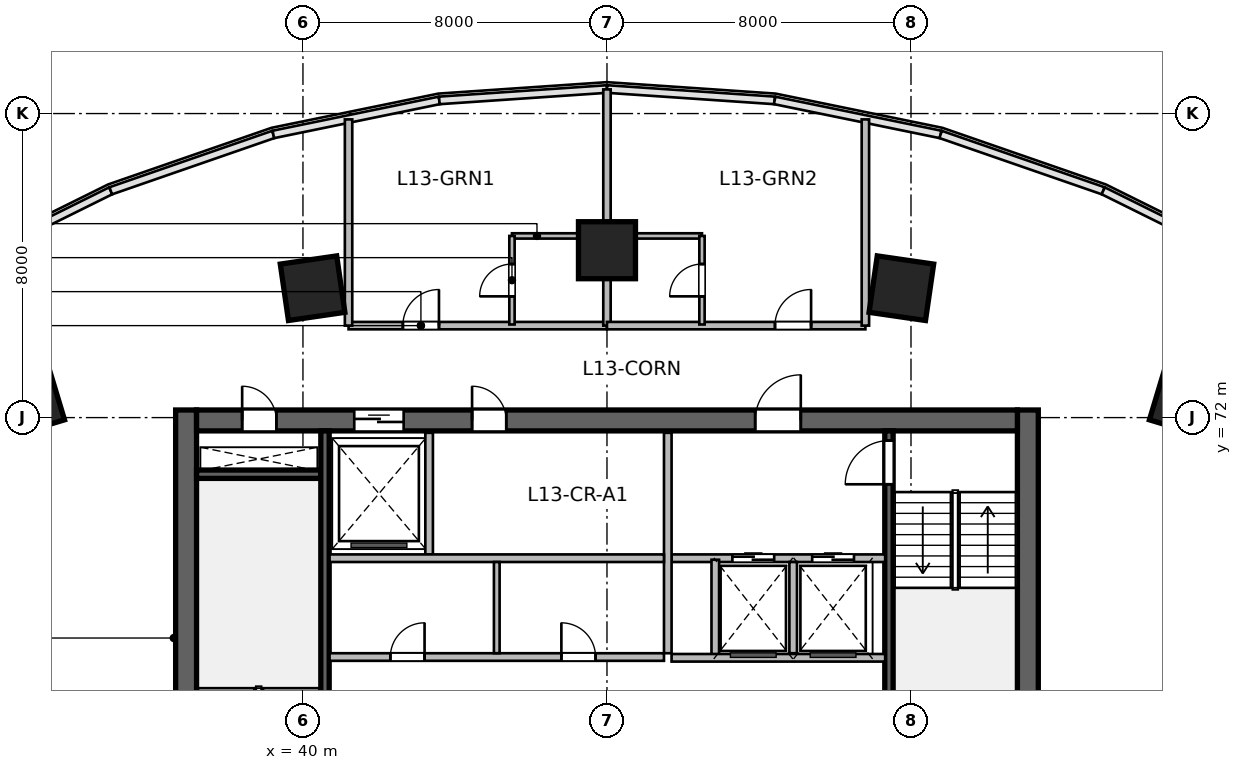
"""IFC4 building model, lengths in metres.
Left out: names, types, materials, properties, quantities, classifications, styles, units other than length and angle.
Written with IfcOpenShell. Run it as: python <this file> out.ifc"""

import sys

from ifc_helpers import new_model, si_unit, direction, frame, frame_2d, origin, origin_2d, place, context, subcontext, project, spatial, rectangle, extrude, source, transform, mapped, element, fill, save


model = new_model("IFC4")
c1 = context("Model", 3, precision=1e-05, world=origin(), true_north=direction((0.0, 1.0)))
c2 = subcontext(c1, "Body", "Model", "MODEL_VIEW")
j1 = project(units=[si_unit("LENGTHUNIT", "METRE"), si_unit("PLANEANGLEUNIT", "RADIAN")], contexts=[c1])
p1 = place(None, origin())
s1 = spatial("IfcSite", under=j1, at=p1, CompositionType="ELEMENT")
p2 = place(p1, origin())
s2 = spatial("IfcBuilding", under=s1, at=p2, CompositionType="ELEMENT")
p3 = place(p2, frame((0.0, 0.0, 60.6)))
s3 = spatial("IfcBuildingStorey", under=s2, at=p3, CompositionType="ELEMENT", Elevation=60.6)
m1 = source(origin(), c2, "Body", "SweptSolid", [
    extrude(rectangle(XDim=12.0, YDim=0.55, at=frame_2d((6.0, 0.0))), origin(), (0.0, 0.0, 1.0), 3.6),
])
for number, where, z_axis, x_axis in (
    (1, (36.925, 60.2, 0.0), (0.0, 0.0, 1.0), (0.0, 1.0, 0.0)),
    (2, (59.075, 60.2, 0.0), (0.0, 0.0, 1.0), (0.0, 1.0, 0.0)),
):
    element("IfcWall", number, at=place(p3, frame(where, z_axis=z_axis, x_axis=x_axis)), inside=s3, PredefinedType="SHEAR", context=c2, shape_type="MappedRepresentation", body=[
        mapped(m1, transform((0.0, 0.0, 0.0), scale=1.0)),
    ])
m2 = source(origin(), c2, "Body", "SweptSolid", [
    extrude(rectangle(XDim=21.6, YDim=0.55, at=frame_2d((10.8, 0.0))), origin(), (0.0, 0.0, 1.0), 3.6),
])
p4 = place(p3, frame((37.2, 71.925, 0.0), z_axis=(0.0, 0.0, 1.0), x_axis=(1.0, 0.0, 0.0)))
e3 = element("IfcWall", 3, at=p4, inside=s3, PredefinedType="SHEAR", context=c2, shape_type="MappedRepresentation", body=[
    mapped(m2, transform((0.0, 0.0, 0.0), scale=1.0)),
])
p5 = place(p4, frame((1.2, 0.0, 0.0)))
e4 = element("IfcOpeningElement", 4, at=p5, cuts=e3, PredefinedType="OPENING", context=c2, shape_type="SweptSolid", body=[
    extrude(rectangle(XDim=0.9, YDim=2.1, at=frame_2d((0.45, 1.05))), frame((0.0, 0.285, 0.0), z_axis=(0.0, -1.0, 0.0), x_axis=(1.0, 0.0, 0.0)), (0.0, 0.0, 1.0), 0.57),
])
p6 = place(p4, frame((14.7, 0.0, 0.0)))
e5 = element("IfcOpeningElement", 5, at=p6, cuts=e3, PredefinedType="OPENING", context=c2, shape_type="SweptSolid", body=[
    extrude(rectangle(XDim=1.2, YDim=2.15, at=frame_2d((0.6, 1.075))), frame((0.0, 0.285, 0.0), z_axis=(0.0, -1.0, 0.0), x_axis=(1.0, 0.0, 0.0)), (0.0, 0.0, 1.0), 0.57),
])
p7 = place(p4, frame((4.15, 0.0, 0.0)))
e6 = element("IfcOpeningElement", 6, at=p7, cuts=e3, PredefinedType="OPENING", context=c2, shape_type="SweptSolid", body=[
    extrude(rectangle(XDim=1.3, YDim=2.15, at=frame_2d((0.65, 1.075))), frame((0.0, 0.285, 0.0), z_axis=(0.0, -1.0, 0.0), x_axis=(1.0, 0.0, 0.0)), (0.0, 0.0, 1.0), 0.57),
])
p8 = place(p4, frame((7.25, 0.0, 0.0)))
e7 = element("IfcOpeningElement", 7, at=p8, cuts=e3, PredefinedType="OPENING", context=c2, shape_type="SweptSolid", body=[
    extrude(rectangle(XDim=0.9, YDim=2.1, at=frame_2d((0.45, 1.05))), frame((0.0, 0.285, 0.0), z_axis=(0.0, -1.0, 0.0), x_axis=(1.0, 0.0, 0.0)), (0.0, 0.0, 1.0), 0.57),
])
m3 = source(origin(), c2, "Body", "SweptSolid", [
    extrude(rectangle(XDim=3.27, YDim=0.22, at=frame_2d((1.635, 0.0))), origin(), (0.0, 0.0, 1.0), 3.6),
])
p9 = place(p3, frame((37.2, 70.51, 0.0), z_axis=(0.0, 0.0, 1.0), x_axis=(1.0, 0.0, 0.0)))
e8 = element("IfcWall", 8, at=p9, inside=s3, PredefinedType="SHEAR", context=c2, shape_type="MappedRepresentation", body=[
    mapped(m3, transform((0.0, 0.0, 0.0), scale=1.0)),
])
m4 = source(origin(), c2, "Body", "SweptSolid", [
    extrude(rectangle(XDim=10.9, YDim=0.22, at=frame_2d((5.45, 0.0))), origin(), (0.0, 0.0, 1.0), 3.6),
])
p10 = place(p3, frame((40.58, 60.75, 0.0), z_axis=(0.0, 0.0, 1.0), x_axis=(0.0, 1.0, 0.0)))
e9 = element("IfcWall", 9, at=p10, inside=s3, PredefinedType="SHEAR", context=c2, shape_type="MappedRepresentation", body=[
    mapped(m4, transform((0.0, 0.0, 0.0), scale=1.0)),
])
p11 = place(p3, frame((55.42, 60.75, 0.0), z_axis=(0.0, 0.0, 1.0), x_axis=(0.0, 1.0, 0.0)))
e10 = element("IfcWall", 10, at=p11, inside=s3, PredefinedType="SHEAR", context=c2, shape_type="MappedRepresentation", body=[
    mapped(m4, transform((0.0, 0.0, 0.0), scale=1.0)),
])
p12 = place(p11, frame((9.495, 0.0, 0.0)))
e11 = element("IfcOpeningElement", 11, at=p12, cuts=e10, PredefinedType="OPENING", context=c2, shape_type="SweptSolid", body=[
    extrude(rectangle(XDim=1.15, YDim=2.15, at=frame_2d((0.575, 1.075))), frame((0.0, 0.12, 0.0), z_axis=(0.0, -1.0, 0.0), x_axis=(1.0, 0.0, 0.0)), (0.0, 0.0, 1.0), 0.24),
])
m5 = source(origin(), c2, "Body", "SweptSolid", [
    extrude(rectangle(XDim=1.5, YDim=1.5, at=origin_2d()), origin(), (0.0, 0.0, 1.0), 3.6),
])
for number, where, z_axis, x_axis in (
    (12, (32.791, 72.442, 0.0), (0.0, 0.0, 1.0), (-0.289, 0.957, 0.0)),
    (13, (40.253, 75.404, 0.0), (0.0, 0.0, 1.0), (-0.143, 0.99, 0.0)),
    (14, (48.0, 76.404, 0.0), (0.0, 0.0, 1.0), (0.0, 1.0, 0.0)),
    (15, (55.747, 75.404, 0.0), (0.0, 0.0, 1.0), (0.143, 0.99, 0.0)),
    (16, (63.209, 72.442, 0.0), (0.0, 0.0, 1.0), (0.289, 0.957, 0.0)),
):
    element("IfcColumn", number, at=place(p3, frame(where, z_axis=z_axis, x_axis=x_axis)), inside=s3, PredefinedType="COLUMN", context=c2, shape_type="MappedRepresentation", body=[
        mapped(m5, transform((0.0, 0.0, 0.0), scale=1.0)),
    ])
m6 = source(origin(), c2, "Body", "SweptSolid", [
    extrude(rectangle(XDim=5.62, YDim=0.2, at=frame_2d((2.81, 0.0))), origin(), (0.0, 0.0, 1.0), 3.36),
])
p13 = place(p3, frame((49.7, 68.3, 0.0), z_axis=(0.0, 0.0, 1.0), x_axis=(1.0, 0.0, 0.0)))
e17 = element("IfcWall", 17, at=p13, inside=s3, PredefinedType="SOLIDWALL", context=c2, shape_type="MappedRepresentation", body=[
    mapped(m6, transform((0.0, 0.0, 0.0), scale=1.0)),
])
p14 = place(p13, frame((1.6, 0.0, 0.0)))
e18 = element("IfcOpeningElement", 18, at=p14, cuts=e17, PredefinedType="OPENING", context=c2, shape_type="SweptSolid", body=[
    extrude(rectangle(XDim=1.1, YDim=2.15, at=frame_2d((0.55, 1.075))), frame((0.0, 0.11, 0.0), z_axis=(0.0, -1.0, 0.0), x_axis=(1.0, 0.0, 0.0)), (0.0, 0.0, 1.0), 0.22),
])
p15 = place(p13, frame((3.7, 0.0, 0.0)))
e19 = element("IfcOpeningElement", 19, at=p15, cuts=e17, PredefinedType="OPENING", context=c2, shape_type="SweptSolid", body=[
    extrude(rectangle(XDim=1.1, YDim=2.15, at=frame_2d((0.55, 1.075))), frame((0.0, 0.11, 0.0), z_axis=(0.0, -1.0, 0.0), x_axis=(1.0, 0.0, 0.0)), (0.0, 0.0, 1.0), 0.22),
])
m7 = source(origin(), c2, "Body", "SweptSolid", [
    extrude(rectangle(XDim=5.8, YDim=0.2, at=frame_2d((2.9, 0.0))), origin(), (0.0, 0.0, 1.0), 3.36),
])
p16 = place(p3, frame((49.6, 65.8, 0.0), z_axis=(0.0, 0.0, 1.0), x_axis=(0.0, 1.0, 0.0)))
e20 = element("IfcWall", 20, at=p16, inside=s3, PredefinedType="SOLIDWALL", context=c2, shape_type="MappedRepresentation", body=[
    mapped(m7, transform((0.0, 0.0, 0.0), scale=1.0)),
])
m8 = source(origin(), c2, "Body", "SweptSolid", [
    extrude(rectangle(XDim=2.58, YDim=0.2, at=frame_2d((1.29, 0.0))), origin(), (0.0, 0.0, 1.0), 3.36),
])
p17 = place(p3, frame((50.85, 65.68, 0.0), z_axis=(0.0, 0.0, 1.0), x_axis=(0.0, 1.0, 0.0)))
e21 = element("IfcWall", 21, at=p17, inside=s3, PredefinedType="SOLIDWALL", context=c2, shape_type="MappedRepresentation", body=[
    mapped(m8, transform((0.0, 0.0, 0.0), scale=1.0)),
])
m9 = source(origin(), c2, "Body", "SweptSolid", [
    extrude(rectangle(XDim=2.4, YDim=0.2, at=frame_2d((1.2, 0.0))), origin(), (0.0, 0.0, 1.0), 3.36),
])
p18 = place(p3, frame((52.9, 65.8, 0.0), z_axis=(0.0, 0.0, 1.0), x_axis=(0.0, 1.0, 0.0)))
e22 = element("IfcWall", 22, at=p18, inside=s3, PredefinedType="SOLIDWALL", context=c2, shape_type="MappedRepresentation", body=[
    mapped(m9, transform((0.0, 0.0, 0.0), scale=1.0)),
])
p19 = place(p3, frame((49.7, 65.68, 0.0), z_axis=(0.0, 0.0, 1.0), x_axis=(1.0, 0.0, 0.0)))
e23 = element("IfcWall", 23, at=p19, inside=s3, PredefinedType="SOLIDWALL", context=c2, shape_type="MappedRepresentation", body=[
    mapped(m6, transform((0.0, 0.0, 0.0), scale=1.0)),
])
m10 = source(origin(), c2, "Body", "SweptSolid", [
    extrude(rectangle(XDim=3.2, YDim=0.2, at=frame_2d((1.6, 0.0))), origin(), (0.0, 0.0, 1.0), 3.36),
])
p20 = place(p3, frame((43.32, 68.4, 0.0), z_axis=(0.0, 0.0, 1.0), x_axis=(0.0, 1.0, 0.0)))
e24 = element("IfcWall", 24, at=p20, inside=s3, PredefinedType="SOLIDWALL", context=c2, shape_type="MappedRepresentation", body=[
    mapped(m10, transform((0.0, 0.0, 0.0), scale=1.0)),
])
m11 = source(origin(), c2, "Body", "SweptSolid", [
    extrude(rectangle(XDim=8.8, YDim=0.2, at=frame_2d((4.4, 0.0))), origin(), (0.0, 0.0, 1.0), 3.36),
])
p21 = place(p3, frame((40.7, 68.3, 0.0), z_axis=(0.0, 0.0, 1.0), x_axis=(1.0, 0.0, 0.0)))
e25 = element("IfcWall", 25, at=p21, inside=s3, PredefinedType="SOLIDWALL", context=c2, shape_type="MappedRepresentation", body=[
    mapped(m11, transform((0.0, 0.0, 0.0), scale=1.0)),
])
p22 = place(p3, frame((40.7, 65.7, 0.0), z_axis=(0.0, 0.0, 1.0), x_axis=(1.0, 0.0, 0.0)))
e26 = element("IfcWall", 26, at=p22, inside=s3, PredefinedType="SOLIDWALL", context=c2, shape_type="MappedRepresentation", body=[
    mapped(m11, transform((0.0, 0.0, 0.0), scale=1.0)),
])
p23 = place(p22, frame((1.6, 0.0, 0.0)))
e27 = element("IfcOpeningElement", 27, at=p23, cuts=e26, PredefinedType="OPENING", context=c2, shape_type="SweptSolid", body=[
    extrude(rectangle(XDim=0.9, YDim=2.1, at=frame_2d((0.45, 1.05))), frame((0.0, 0.11, 0.0), z_axis=(0.0, -1.0, 0.0), x_axis=(1.0, 0.0, 0.0)), (0.0, 0.0, 1.0), 0.22),
])
p24 = place(p22, frame((6.1, 0.0, 0.0)))
e28 = element("IfcOpeningElement", 28, at=p24, cuts=e26, PredefinedType="OPENING", context=c2, shape_type="SweptSolid", body=[
    extrude(rectangle(XDim=0.9, YDim=2.1, at=frame_2d((0.45, 1.05))), frame((0.0, 0.11, 0.0), z_axis=(0.0, -1.0, 0.0), x_axis=(1.0, 0.0, 0.0)), (0.0, 0.0, 1.0), 0.22),
])
m12 = source(origin(), c2, "Body", "SweptSolid", [
    extrude(rectangle(XDim=2.4, YDim=0.15, at=frame_2d((1.2, 0.0))), origin(), (0.0, 0.0, 1.0), 3.36),
])
p25 = place(p3, frame((45.1, 65.8, 0.0), z_axis=(0.0, 0.0, 1.0), x_axis=(0.0, 1.0, 0.0)))
e29 = element("IfcWall", 29, at=p25, inside=s3, PredefinedType="PARTITIONING", context=c2, shape_type="MappedRepresentation", body=[
    mapped(m12, transform((0.0, 0.0, 0.0), scale=1.0)),
])
m13 = source(origin(), c2, "Body", "SweptSolid", [
    extrude(rectangle(XDim=6.8, YDim=0.195, at=frame_2d((3.4, 0.0))), origin(), (0.0, 0.0, 1.0), 3.36),
])
p26 = place(p3, frame((41.2, 74.42, 0.0), z_axis=(0.0, 0.0, 1.0), x_axis=(1.0, 0.0, 0.0)))
e30 = element("IfcWall", 30, at=p26, inside=s3, PredefinedType="PARTITIONING", context=c2, shape_type="MappedRepresentation", body=[
    mapped(m13, transform((0.0, 0.0, 0.0), scale=1.0)),
])
p27 = place(p26, frame((1.429, 0.0, 0.0)))
e31 = element("IfcOpeningElement", 31, at=p27, cuts=e30, PredefinedType="OPENING", context=c2, shape_type="SweptSolid", body=[
    extrude(rectangle(XDim=0.95, YDim=2.15, at=frame_2d((0.475, 1.075))), frame((0.0, 0.107, 0.0), z_axis=(0.0, -1.0, 0.0), x_axis=(1.0, 0.0, 0.0)), (0.0, 0.0, 1.0), 0.215),
])
m14 = source(origin(), c2, "Body", "SweptSolid", [
    extrude(rectangle(XDim=6.216, YDim=0.195, at=frame_2d((3.108, 0.0))), origin(), (0.0, 0.0, 1.0), 2.644),
])
p28 = place(p3, frame((48.0, 74.42, 0.0), z_axis=(0.0, 0.0, 1.0), x_axis=(0.0, 1.0, 0.0)))
e32 = element("IfcWall", 32, at=p28, inside=s3, PredefinedType="PARTITIONING", context=c2, shape_type="MappedRepresentation", body=[
    mapped(m14, transform((0.0, 0.0, 0.0), scale=1.0)),
])
m15 = source(origin(), c2, "Body", "SweptSolid", [
    extrude(rectangle(XDim=5.426, YDim=0.195, at=frame_2d((2.713, 0.0))), origin(), (0.0, 0.0, 1.0), 3.36),
])
p29 = place(p3, frame((41.2, 74.42, 0.0), z_axis=(0.0, 0.0, 1.0), x_axis=(0.0, 1.0, 0.0)))
e33 = element("IfcWall", 33, at=p29, inside=s3, PredefinedType="PARTITIONING", context=c2, shape_type="MappedRepresentation", body=[
    mapped(m15, transform((0.0, 0.0, 0.0), scale=1.0)),
])
m16 = source(origin(), c2, "Body", "SweptSolid", [
    extrude(rectangle(XDim=2.35, YDim=0.14, at=frame_2d((1.175, 0.0))), origin(), (0.0, 0.0, 1.0), 3.36),
])
p30 = place(p3, frame((45.5, 76.78, 0.0), z_axis=(0.0, 0.0, 1.0), x_axis=(1.0, 0.0, 0.0)))
e34 = element("IfcWall", 34, at=p30, inside=s3, PredefinedType="PARTITIONING", context=c2, shape_type="MappedRepresentation", body=[
    mapped(m16, transform((0.0, 0.0, 0.0), scale=1.0)),
])
m17 = source(origin(), c2, "Body", "SweptSolid", [
    extrude(rectangle(XDim=2.33, YDim=0.14, at=frame_2d((1.165, 0.0))), origin(), (0.0, 0.0, 1.0), 3.36),
])
p31 = place(p3, frame((45.5, 74.45, 0.0), z_axis=(0.0, 0.0, 1.0), x_axis=(0.0, 1.0, 0.0)))
e35 = element("IfcWall", 35, at=p31, inside=s3, PredefinedType="PARTITIONING", context=c2, shape_type="MappedRepresentation", body=[
    mapped(m17, transform((0.0, 0.0, 0.0), scale=1.0)),
])
p32 = place(p31, frame((0.74, 0.0, 0.0)))
e36 = element("IfcOpeningElement", 36, at=p32, cuts=e35, PredefinedType="OPENING", context=c2, shape_type="SweptSolid", body=[
    extrude(rectangle(XDim=0.85, YDim=2.05, at=frame_2d((0.425, 1.025))), frame((0.0, 0.08, 0.0), z_axis=(0.0, -1.0, 0.0), x_axis=(1.0, 0.0, 0.0)), (0.0, 0.0, 1.0), 0.16),
])
p33 = place(p3, frame((48.0, 74.42, 0.0), z_axis=(0.0, 0.0, 1.0), x_axis=(1.0, 0.0, 0.0)))
e37 = element("IfcWall", 37, at=p33, inside=s3, PredefinedType="PARTITIONING", context=c2, shape_type="MappedRepresentation", body=[
    mapped(m13, transform((0.0, 0.0, 0.0), scale=1.0)),
])
p34 = place(p33, frame((4.421, 0.0, 0.0)))
e38 = element("IfcOpeningElement", 38, at=p34, cuts=e37, PredefinedType="OPENING", context=c2, shape_type="SweptSolid", body=[
    extrude(rectangle(XDim=0.95, YDim=2.15, at=frame_2d((0.475, 1.075))), frame((0.0, 0.107, 0.0), z_axis=(0.0, -1.0, 0.0), x_axis=(1.0, 0.0, 0.0)), (0.0, 0.0, 1.0), 0.215),
])
p35 = place(p3, frame((54.8, 74.42, 0.0), z_axis=(0.0, 0.0, 1.0), x_axis=(0.0, 1.0, 0.0)))
e39 = element("IfcWall", 39, at=p35, inside=s3, PredefinedType="PARTITIONING", context=c2, shape_type="MappedRepresentation", body=[
    mapped(m15, transform((0.0, 0.0, 0.0), scale=1.0)),
])
p36 = place(p3, frame((48.15, 76.78, 0.0), z_axis=(0.0, 0.0, 1.0), x_axis=(1.0, 0.0, 0.0)))
e40 = element("IfcWall", 40, at=p36, inside=s3, PredefinedType="PARTITIONING", context=c2, shape_type="MappedRepresentation", body=[
    mapped(m16, transform((0.0, 0.0, 0.0), scale=1.0)),
])
p37 = place(p3, frame((50.5, 74.45, 0.0), z_axis=(0.0, 0.0, 1.0), x_axis=(0.0, 1.0, 0.0)))
e41 = element("IfcWall", 41, at=p37, inside=s3, PredefinedType="PARTITIONING", context=c2, shape_type="MappedRepresentation", body=[
    mapped(m17, transform((0.0, 0.0, 0.0), scale=1.0)),
])
p38 = place(p37, frame((0.74, 0.0, 0.0)))
e42 = element("IfcOpeningElement", 42, at=p38, cuts=e41, PredefinedType="OPENING", context=c2, shape_type="SweptSolid", body=[
    extrude(rectangle(XDim=0.85, YDim=2.05, at=frame_2d((0.425, 1.025))), frame((0.0, 0.08, 0.0), z_axis=(0.0, -1.0, 0.0), x_axis=(1.0, 0.0, 0.0)), (0.0, 0.0, 1.0), 0.16),
])
m18 = source(origin(), c2, "Body", "SweptSolid", [
    extrude(rectangle(XDim=0.9, YDim=2.1, at=frame_2d((0.45, 1.05))), frame((0.0, 0.025, 0.0), z_axis=(0.0, -1.0, 0.0), x_axis=(1.0, 0.0, 0.0)), (0.0, 0.0, 1.0), 0.05),
])
p39 = place(p5, origin())
e43 = element("IfcDoor", 43, at=p39, inside=s3, OperationType="SINGLE_SWING_LEFT", PredefinedType="DOOR", context=c2, shape_type="MappedRepresentation", body=[
    mapped(m18, transform((0.0, 0.0, 0.0), scale=1.0)),
])
fill(e4, e43)
m19 = source(origin(), c2, "Body", "SweptSolid", [
    extrude(rectangle(XDim=1.15, YDim=2.15, at=frame_2d((0.575, 1.075))), frame((0.0, 0.025, 0.0), z_axis=(0.0, -1.0, 0.0), x_axis=(1.0, 0.0, 0.0)), (0.0, 0.0, 1.0), 0.05),
])
p40 = place(p12, origin())
e44 = element("IfcDoor", 44, at=p40, inside=s3, OperationType="SINGLE_SWING_LEFT", PredefinedType="DOOR", context=c2, shape_type="MappedRepresentation", body=[
    mapped(m19, transform((0.0, 0.0, 0.0), scale=1.0)),
])
fill(e11, e44)
m20 = source(origin(), c2, "Body", "SweptSolid", [
    extrude(rectangle(XDim=1.2, YDim=2.15, at=frame_2d((0.6, 1.075))), frame((0.0, 0.025, 0.0), z_axis=(0.0, -1.0, 0.0), x_axis=(1.0, 0.0, 0.0)), (0.0, 0.0, 1.0), 0.05),
])
p41 = place(p6, origin())
e45 = element("IfcDoor", 45, at=p41, inside=s3, OperationType="SINGLE_SWING_RIGHT", PredefinedType="DOOR", context=c2, shape_type="MappedRepresentation", body=[
    mapped(m20, transform((0.0, 0.0, 0.0), scale=1.0)),
])
fill(e5, e45)
m21 = source(origin(), c2, "Body", "SweptSolid", [
    extrude(rectangle(XDim=1.1, YDim=2.15, at=frame_2d((0.55, 1.075))), frame((0.0, 0.025, 0.0), z_axis=(0.0, -1.0, 0.0), x_axis=(1.0, 0.0, 0.0)), (0.0, 0.0, 1.0), 0.05),
])
p42 = place(p14, origin())
e46 = element("IfcDoor", 46, at=p42, inside=s3, OperationType="DOUBLE_DOOR_SLIDING", PredefinedType="DOOR", context=c2, shape_type="MappedRepresentation", body=[
    mapped(m21, transform((0.0, 0.0, 0.0), scale=1.0)),
])
fill(e18, e46)
p43 = place(p15, origin())
e47 = element("IfcDoor", 47, at=p43, inside=s3, OperationType="DOUBLE_DOOR_SLIDING", PredefinedType="DOOR", context=c2, shape_type="MappedRepresentation", body=[
    mapped(m21, transform((0.0, 0.0, 0.0), scale=1.0)),
])
fill(e19, e47)
m22 = source(origin(), c2, "Body", "SweptSolid", [
    extrude(rectangle(XDim=1.3, YDim=2.15, at=frame_2d((0.65, 1.075))), frame((0.0, 0.025, 0.0), z_axis=(0.0, -1.0, 0.0), x_axis=(1.0, 0.0, 0.0)), (0.0, 0.0, 1.0), 0.05),
])
p44 = place(p7, origin())
e48 = element("IfcDoor", 48, at=p44, inside=s3, OperationType="DOUBLE_DOOR_SLIDING", PredefinedType="DOOR", context=c2, shape_type="MappedRepresentation", body=[
    mapped(m22, transform((0.0, 0.0, 0.0), scale=1.0)),
])
fill(e6, e48)
p45 = place(p8, origin())
e49 = element("IfcDoor", 49, at=p45, inside=s3, OperationType="SINGLE_SWING_LEFT", PredefinedType="DOOR", context=c2, shape_type="MappedRepresentation", body=[
    mapped(m18, transform((0.0, 0.0, 0.0), scale=1.0)),
])
fill(e7, e49)
p46 = place(p23, origin())
e50 = element("IfcDoor", 50, at=p46, inside=s3, OperationType="SINGLE_SWING_RIGHT", PredefinedType="DOOR", context=c2, shape_type="MappedRepresentation", body=[
    mapped(m18, transform((0.0, 0.0, 0.0), scale=1.0)),
])
fill(e27, e50)
p47 = place(p24, origin())
e51 = element("IfcDoor", 51, at=p47, inside=s3, OperationType="SINGLE_SWING_LEFT", PredefinedType="DOOR", context=c2, shape_type="MappedRepresentation", body=[
    mapped(m18, transform((0.0, 0.0, 0.0), scale=1.0)),
])
fill(e28, e51)
m23 = source(origin(), c2, "Body", "SweptSolid", [
    extrude(rectangle(XDim=0.95, YDim=2.15, at=frame_2d((0.475, 1.075))), frame((0.0, 0.025, 0.0), z_axis=(0.0, -1.0, 0.0), x_axis=(1.0, 0.0, 0.0)), (0.0, 0.0, 1.0), 0.05),
])
p48 = place(p27, origin())
e52 = element("IfcDoor", 52, at=p48, inside=s3, OperationType="SINGLE_SWING_RIGHT", PredefinedType="DOOR", context=c2, shape_type="MappedRepresentation", body=[
    mapped(m23, transform((0.0, 0.0, 0.0), scale=1.0)),
])
fill(e31, e52)
m24 = source(origin(), c2, "Body", "SweptSolid", [
    extrude(rectangle(XDim=0.85, YDim=2.05, at=frame_2d((0.425, 1.025))), frame((0.0, 0.025, 0.0), z_axis=(0.0, -1.0, 0.0), x_axis=(1.0, 0.0, 0.0)), (0.0, 0.0, 1.0), 0.05),
])
p49 = place(p32, origin())
e53 = element("IfcDoor", 53, at=p49, inside=s3, OperationType="SINGLE_SWING_LEFT", PredefinedType="DOOR", context=c2, shape_type="MappedRepresentation", body=[
    mapped(m24, transform((0.0, 0.0, 0.0), scale=1.0)),
])
fill(e36, e53)
p50 = place(p34, origin())
e54 = element("IfcDoor", 54, at=p50, inside=s3, OperationType="SINGLE_SWING_RIGHT", PredefinedType="DOOR", context=c2, shape_type="MappedRepresentation", body=[
    mapped(m23, transform((0.0, 0.0, 0.0), scale=1.0)),
])
fill(e38, e54)
p51 = place(p38, origin())
e55 = element("IfcDoor", 55, at=p51, inside=s3, OperationType="SINGLE_SWING_LEFT", PredefinedType="DOOR", context=c2, shape_type="MappedRepresentation", body=[
    mapped(m24, transform((0.0, 0.0, 0.0), scale=1.0)),
])
fill(e42, e55)
save(model, sys.argv[1])
